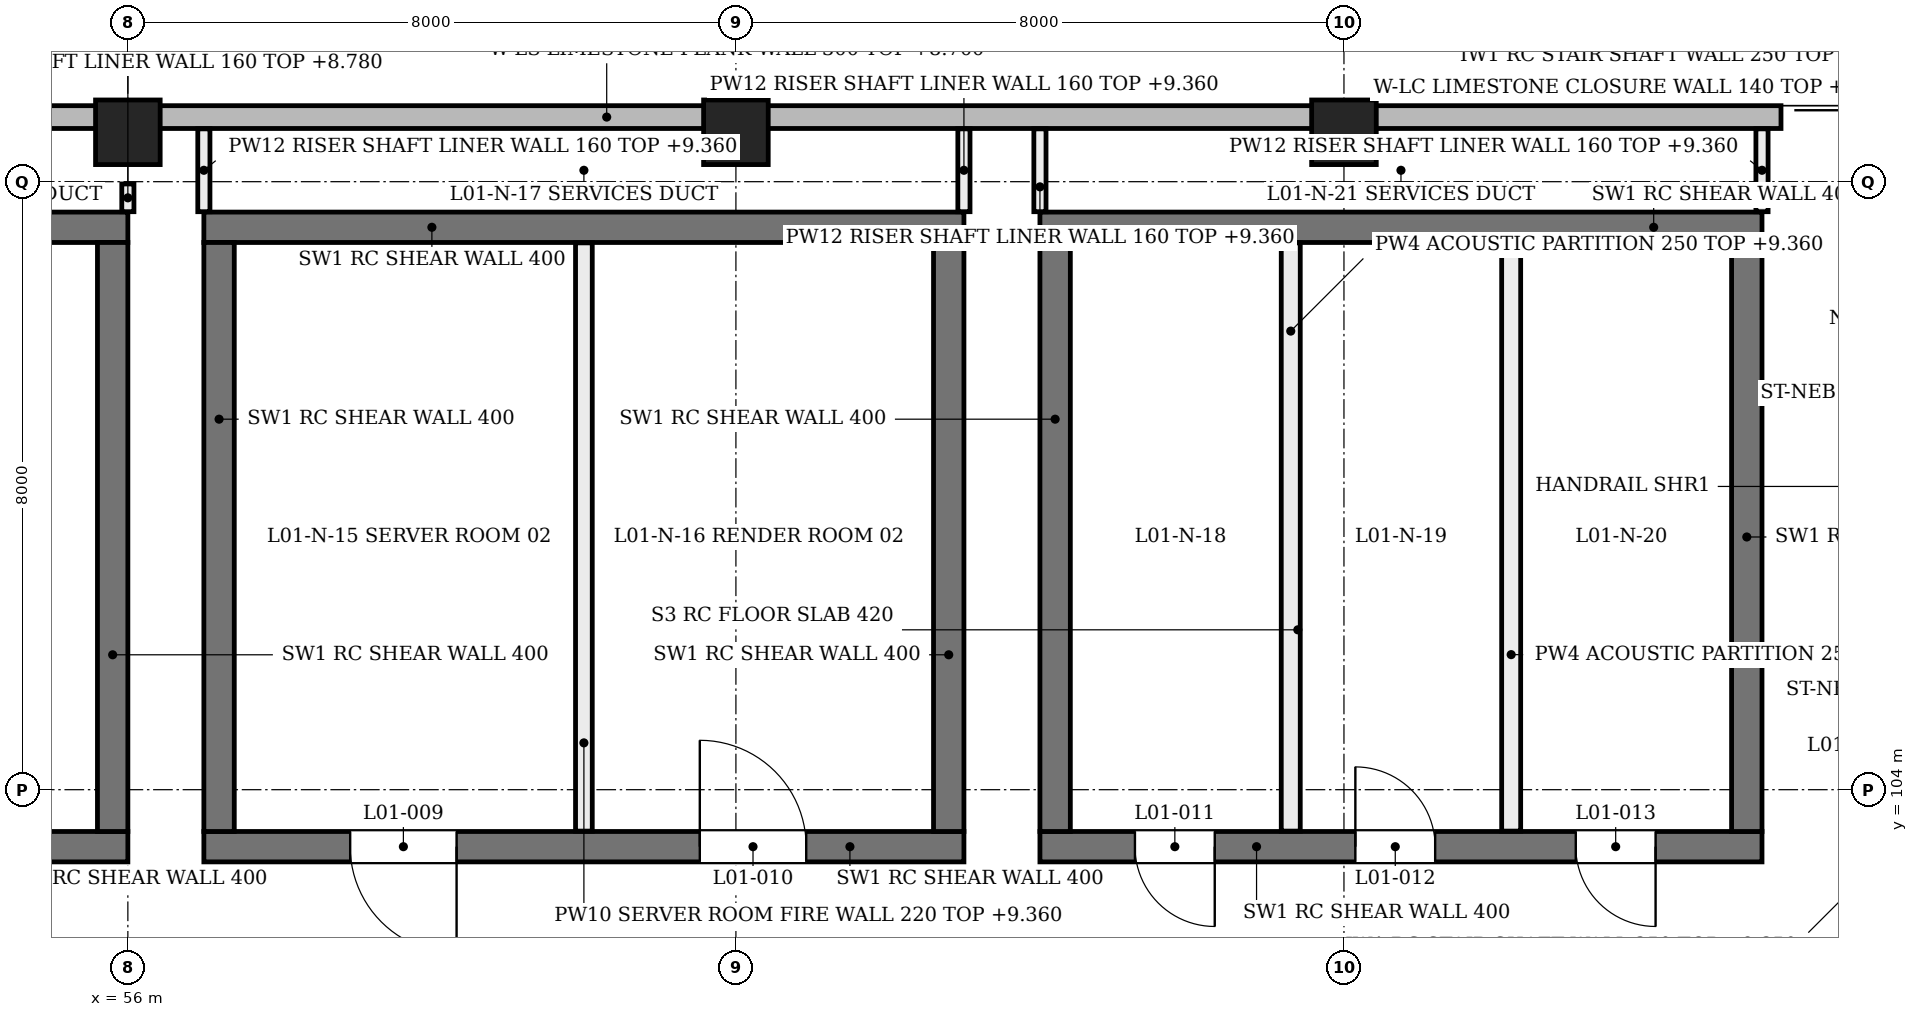
"""IFC4 building model, lengths in metres.
Left out: names, types, materials, properties, quantities, classifications, styles, units other than length and angle.
Written with IfcOpenShell. Run it as: python <this file> out.ifc"""

import sys

from ifc_helpers import new_model, si_unit, direction, frame, frame_2d, origin, origin_2d, place, context, subcontext, project, spatial, rectangle, extrude, element, fill, save


model = new_model("IFC4")
c1 = context("Model", 3, precision=1e-05, world=origin(), true_north=direction((0.0, 1.0)))
c2 = subcontext(c1, "Body", "Model", "MODEL_VIEW")
j1 = project(units=[si_unit("LENGTHUNIT", "METRE"), si_unit("PLANEANGLEUNIT", "RADIAN")], contexts=[c1])
p1 = place(None, origin())
s1 = spatial("IfcSite", under=j1, at=p1, CompositionType="ELEMENT")
p2 = place(p1, origin())
s2 = spatial("IfcBuilding", under=s1, at=p2, CompositionType="ELEMENT")
p3 = place(p2, frame((0.0, 0.0, 4.8)))
s3 = spatial("IfcBuildingStorey", under=s2, at=p3, CompositionType="ELEMENT", Elevation=4.8)
p4 = place(p3, frame((46.0, 103.25, 0.0), z_axis=(0.0, 0.0, 1.0), x_axis=(1.0, 0.0, 0.0)))
e1 = element("IfcWall", 1, at=p4, inside=s3, PredefinedType="SHEAR", context=c2, shape_type="SweptSolid", body=[
    extrude(rectangle(XDim=10.0, YDim=0.4, at=frame_2d((5.0, 0.0))), origin(), (0.0, 0.0, 1.0), 4.58),
])
p5 = place(p4, frame((2.025, 0.0, 0.0)))
e2 = element("IfcOpeningElement", 2, at=p5, cuts=e1, PredefinedType="OPENING", context=c2, shape_type="SweptSolid", body=[
    extrude(rectangle(XDim=1.2, YDim=2.2, at=frame_2d((0.6, 1.1))), frame((0.0, 0.21, 0.0), z_axis=(0.0, -1.0, 0.0), x_axis=(1.0, 0.0, 0.0)), (0.0, 0.0, 1.0), 0.42),
])
p6 = place(p4, frame((6.625, 0.0, 0.0)))
e3 = element("IfcOpeningElement", 3, at=p6, cuts=e1, PredefinedType="OPENING", context=c2, shape_type="SweptSolid", body=[
    extrude(rectangle(XDim=1.2, YDim=2.2, at=frame_2d((0.6, 1.1))), frame((0.0, 0.21, 0.0), z_axis=(0.0, -1.0, 0.0), x_axis=(1.0, 0.0, 0.0)), (0.0, 0.0, 1.0), 0.42),
])
p7 = place(p3, frame((46.0, 111.4, 0.0), z_axis=(0.0, 0.0, 1.0), x_axis=(1.0, 0.0, 0.0)))
e4 = element("IfcWall", 4, at=p7, inside=s3, PredefinedType="SHEAR", context=c2, shape_type="SweptSolid", body=[
    extrude(rectangle(XDim=10.0, YDim=0.4, at=frame_2d((5.0, 0.0))), origin(), (0.0, 0.0, 1.0), 4.58),
])
p8 = place(p3, frame((55.8, 103.45, 0.0), z_axis=(0.0, 0.0, 1.0), x_axis=(0.0, 1.0, 0.0)))
e5 = element("IfcWall", 5, at=p8, inside=s3, PredefinedType="SHEAR", context=c2, shape_type="SweptSolid", body=[
    extrude(rectangle(XDim=7.75, YDim=0.4, at=frame_2d((3.875, 0.0))), origin(), (0.0, 0.0, 1.0), 4.58),
])
p9 = place(p3, frame((57.0, 103.25, 0.0), z_axis=(0.0, 0.0, 1.0), x_axis=(1.0, 0.0, 0.0)))
e6 = element("IfcWall", 6, at=p9, inside=s3, PredefinedType="SHEAR", context=c2, shape_type="SweptSolid", body=[
    extrude(rectangle(XDim=10.0, YDim=0.4, at=frame_2d((5.0, 0.0))), origin(), (0.0, 0.0, 1.0), 4.58),
])
p10 = place(p9, frame((1.925, 0.0, 0.0)))
e7 = element("IfcOpeningElement", 7, at=p10, cuts=e6, PredefinedType="OPENING", context=c2, shape_type="SweptSolid", body=[
    extrude(rectangle(XDim=1.4, YDim=2.1, at=frame_2d((0.7, 1.05))), frame((0.0, 0.21, 0.0), z_axis=(0.0, -1.0, 0.0), x_axis=(1.0, 0.0, 0.0)), (0.0, 0.0, 1.0), 0.42),
])
p11 = place(p9, frame((6.525, 0.0, 0.0)))
e8 = element("IfcOpeningElement", 8, at=p11, cuts=e6, PredefinedType="OPENING", context=c2, shape_type="SweptSolid", body=[
    extrude(rectangle(XDim=1.4, YDim=2.1, at=frame_2d((0.7, 1.05))), frame((0.0, 0.21, 0.0), z_axis=(0.0, -1.0, 0.0), x_axis=(1.0, 0.0, 0.0)), (0.0, 0.0, 1.0), 0.42),
])
p12 = place(p3, frame((57.0, 111.4, 0.0), z_axis=(0.0, 0.0, 1.0), x_axis=(1.0, 0.0, 0.0)))
e9 = element("IfcWall", 9, at=p12, inside=s3, PredefinedType="SHEAR", context=c2, shape_type="SweptSolid", body=[
    extrude(rectangle(XDim=10.0, YDim=0.4, at=frame_2d((5.0, 0.0))), origin(), (0.0, 0.0, 1.0), 4.58),
])
for number, where, z_axis, x_axis in (
    (10, (57.2, 103.45, 0.0), (0.0, 0.0, 1.0), (0.0, 1.0, 0.0)),
    (11, (66.8, 103.45, 0.0), (0.0, 0.0, 1.0), (0.0, 1.0, 0.0)),
):
    element("IfcWall", number, at=place(p3, frame(where, z_axis=z_axis, x_axis=x_axis)), inside=s3, PredefinedType="SHEAR", context=c2, shape_type="SweptSolid", body=[
        extrude(rectangle(XDim=7.75, YDim=0.4, at=frame_2d((3.875, 0.0))), origin(), (0.0, 0.0, 1.0), 4.58),
    ])
p13 = place(p3, frame((68.0, 103.25, 0.0), z_axis=(0.0, 0.0, 1.0), x_axis=(1.0, 0.0, 0.0)))
e12 = element("IfcWall", 12, at=p13, inside=s3, PredefinedType="SHEAR", context=c2, shape_type="SweptSolid", body=[
    extrude(rectangle(XDim=9.5, YDim=0.4, at=frame_2d((4.75, 0.0))), origin(), (0.0, 0.0, 1.0), 4.58),
])
p14 = place(p13, frame((1.25, 0.0, 0.0)))
e13 = element("IfcOpeningElement", 13, at=p14, cuts=e12, PredefinedType="OPENING", context=c2, shape_type="SweptSolid", body=[
    extrude(rectangle(XDim=1.05, YDim=2.2, at=frame_2d((0.525, 1.1))), frame((0.0, 0.21, 0.0), z_axis=(0.0, -1.0, 0.0), x_axis=(1.0, 0.0, 0.0)), (0.0, 0.0, 1.0), 0.42),
])
p15 = place(p13, frame((4.15, 0.0, 0.0)))
e14 = element("IfcOpeningElement", 14, at=p15, cuts=e12, PredefinedType="OPENING", context=c2, shape_type="SweptSolid", body=[
    extrude(rectangle(XDim=1.05, YDim=2.2, at=frame_2d((0.525, 1.1))), frame((0.0, 0.21, 0.0), z_axis=(0.0, -1.0, 0.0), x_axis=(1.0, 0.0, 0.0)), (0.0, 0.0, 1.0), 0.42),
])
p16 = place(p13, frame((7.05, 0.0, 0.0)))
e15 = element("IfcOpeningElement", 15, at=p16, cuts=e12, PredefinedType="OPENING", context=c2, shape_type="SweptSolid", body=[
    extrude(rectangle(XDim=1.05, YDim=2.2, at=frame_2d((0.525, 1.1))), frame((0.0, 0.21, 0.0), z_axis=(0.0, -1.0, 0.0), x_axis=(1.0, 0.0, 0.0)), (0.0, 0.0, 1.0), 0.42),
])
p17 = place(p3, frame((68.0, 111.4, 0.0), z_axis=(0.0, 0.0, 1.0), x_axis=(1.0, 0.0, 0.0)))
e16 = element("IfcWall", 16, at=p17, inside=s3, PredefinedType="SHEAR", context=c2, shape_type="SweptSolid", body=[
    extrude(rectangle(XDim=9.5, YDim=0.4, at=frame_2d((4.75, 0.0))), origin(), (0.0, 0.0, 1.0), 4.58),
])
for number, where, z_axis, x_axis in (
    (17, (68.2, 103.45, 0.0), (0.0, 0.0, 1.0), (0.0, 1.0, 0.0)),
    (18, (77.3, 103.45, 0.0), (0.0, 0.0, 1.0), (0.0, 1.0, 0.0)),
):
    element("IfcWall", number, at=place(p3, frame(where, z_axis=z_axis, x_axis=x_axis)), inside=s3, PredefinedType="SHEAR", context=c2, shape_type="SweptSolid", body=[
        extrude(rectangle(XDim=7.75, YDim=0.4, at=frame_2d((3.875, 0.0))), origin(), (0.0, 0.0, 1.0), 4.58),
    ])
for number, where, z_axis, x_axis in (
    (19, (56.0, 112.4, 0.0), (0.0, 0.204, 0.979), (-1.0, 0.0, 0.0)),
    (20, (64.0, 112.4, 0.0), (0.0, 0.204, 0.979), (-1.0, 0.0, 0.0)),
    (21, (72.0, 112.4, 0.0), (0.0, 0.204, 0.979), (-1.0, 0.0, 0.0)),
):
    element("IfcColumn", number, at=place(p3, frame(where, z_axis=z_axis, x_axis=x_axis)), inside=s3, PredefinedType="COLUMN", context=c2, shape_type="SweptSolid", body=[
        extrude(rectangle(XDim=0.85, YDim=0.85, at=origin_2d()), origin(), (0.0, 0.0, 1.0), 4.903),
    ])
p18 = place(p3, frame((26.25, 112.85, 0.0), z_axis=(0.0, 0.0, 1.0), x_axis=(1.0, 0.0, 0.0)))
e22 = element("IfcWall", 22, at=p18, inside=s3, PredefinedType="SOLIDWALL", context=c2, shape_type="SweptSolid", body=[
    extrude(rectangle(XDim=51.5, YDim=0.3, at=frame_2d((25.75, 0.0))), origin(), (0.0, 0.0, 1.0), 3.9),
])
p19 = place(p3, frame((77.5, 111.605, 0.0), z_axis=(0.0, 0.0, 1.0), x_axis=(0.0, 1.0, 0.0)))
e23 = element("IfcWall", 23, at=p19, inside=s3, PredefinedType="PARTITIONING", context=c2, shape_type="SweptSolid", body=[
    extrude(rectangle(XDim=1.09, YDim=0.16, at=frame_2d((0.545, 0.0))), origin(), (0.0, 0.0, 1.0), 4.56),
])
p20 = place(p3, frame((56.0, 111.605, 0.0), z_axis=(0.0, 0.0, 1.0), x_axis=(0.0, 1.0, 0.0)))
e24 = element("IfcWall", 24, at=p20, inside=s3, PredefinedType="PARTITIONING", context=c2, shape_type="SweptSolid", body=[
    extrude(rectangle(XDim=0.365, YDim=0.16, at=frame_2d((0.183, 0.0))), origin(), (0.0, 0.0, 1.0), 3.98),
])
p21 = place(p3, frame((62.0, 103.455, 0.0), z_axis=(0.0, 0.0, 1.0), x_axis=(0.0, 1.0, 0.0)))
e25 = element("IfcWall", 25, at=p21, inside=s3, PredefinedType="PARTITIONING", context=c2, shape_type="SweptSolid", body=[
    extrude(rectangle(XDim=7.74, YDim=0.22, at=frame_2d((3.87, 0.0))), origin(), (0.0, 0.0, 1.0), 4.56),
])
for number, where, z_axis, x_axis in (
    (26, (67.0, 111.605, 0.0), (0.0, 0.0, 1.0), (0.0, 1.0, 0.0)),
    (27, (57.0, 111.605, 0.0), (0.0, 0.0, 1.0), (0.0, 1.0, 0.0)),
):
    element("IfcWall", number, at=place(p3, frame(where, z_axis=z_axis, x_axis=x_axis)), inside=s3, PredefinedType="PARTITIONING", context=c2, shape_type="SweptSolid", body=[
        extrude(rectangle(XDim=1.09, YDim=0.16, at=frame_2d((0.545, 0.0))), origin(), (0.0, 0.0, 1.0), 4.56),
    ])
for number, where, z_axis, x_axis in (
    (28, (71.3, 103.455, 0.0), (0.0, 0.0, 1.0), (0.0, 1.0, 0.0)),
    (29, (74.2, 103.455, 0.0), (0.0, 0.0, 1.0), (0.0, 1.0, 0.0)),
):
    element("IfcWall", number, at=place(p3, frame(where, z_axis=z_axis, x_axis=x_axis)), inside=s3, PredefinedType="PARTITIONING", context=c2, shape_type="SweptSolid", body=[
        extrude(rectangle(XDim=7.74, YDim=0.25, at=frame_2d((3.87, 0.0))), origin(), (0.0, 0.0, 1.0), 4.56),
    ])
p22 = place(p3, frame((68.0, 111.605, 0.0), z_axis=(0.0, 0.0, 1.0), x_axis=(0.0, 1.0, 0.0)))
e30 = element("IfcWall", 30, at=p22, inside=s3, PredefinedType="PARTITIONING", context=c2, shape_type="SweptSolid", body=[
    extrude(rectangle(XDim=1.09, YDim=0.16, at=frame_2d((0.545, 0.0))), origin(), (0.0, 0.0, 1.0), 4.56),
])
p23 = place(p10, origin())
e31 = element("IfcDoor", 31, at=p23, inside=s3, OperationType="SINGLE_SWING_RIGHT", PredefinedType="DOOR", context=c2, shape_type="SweptSolid", body=[
    extrude(rectangle(XDim=1.4, YDim=2.1, at=frame_2d((0.7, 1.05))), frame((0.0, 0.025, 0.0), z_axis=(0.0, -1.0, 0.0), x_axis=(1.0, 0.0, 0.0)), (0.0, 0.0, 1.0), 0.05),
])
fill(e7, e31)
p24 = place(p11, origin())
e32 = element("IfcDoor", 32, at=p24, inside=s3, OperationType="SINGLE_SWING_LEFT", PredefinedType="DOOR", context=c2, shape_type="SweptSolid", body=[
    extrude(rectangle(XDim=1.4, YDim=2.1, at=frame_2d((0.7, 1.05))), frame((0.0, 0.025, 0.0), z_axis=(0.0, -1.0, 0.0), x_axis=(1.0, 0.0, 0.0)), (0.0, 0.0, 1.0), 0.05),
])
fill(e8, e32)
p25 = place(p14, origin())
e33 = element("IfcDoor", 33, at=p25, inside=s3, OperationType="SINGLE_SWING_RIGHT", PredefinedType="DOOR", context=c2, shape_type="SweptSolid", body=[
    extrude(rectangle(XDim=1.05, YDim=2.2, at=frame_2d((0.525, 1.1))), frame((0.0, 0.025, 0.0), z_axis=(0.0, -1.0, 0.0), x_axis=(1.0, 0.0, 0.0)), (0.0, 0.0, 1.0), 0.05),
])
fill(e13, e33)
p26 = place(p15, origin())
e34 = element("IfcDoor", 34, at=p26, inside=s3, OperationType="SINGLE_SWING_LEFT", PredefinedType="DOOR", context=c2, shape_type="SweptSolid", body=[
    extrude(rectangle(XDim=1.05, YDim=2.2, at=frame_2d((0.525, 1.1))), frame((0.0, 0.025, 0.0), z_axis=(0.0, -1.0, 0.0), x_axis=(1.0, 0.0, 0.0)), (0.0, 0.0, 1.0), 0.05),
])
fill(e14, e34)
p27 = place(p16, origin())
e35 = element("IfcDoor", 35, at=p27, inside=s3, OperationType="SINGLE_SWING_RIGHT", PredefinedType="DOOR", context=c2, shape_type="SweptSolid", body=[
    extrude(rectangle(XDim=1.05, YDim=2.2, at=frame_2d((0.525, 1.1))), frame((0.0, 0.025, 0.0), z_axis=(0.0, -1.0, 0.0), x_axis=(1.0, 0.0, 0.0)), (0.0, 0.0, 1.0), 0.05),
])
fill(e15, e35)
save(model, sys.argv[1])
